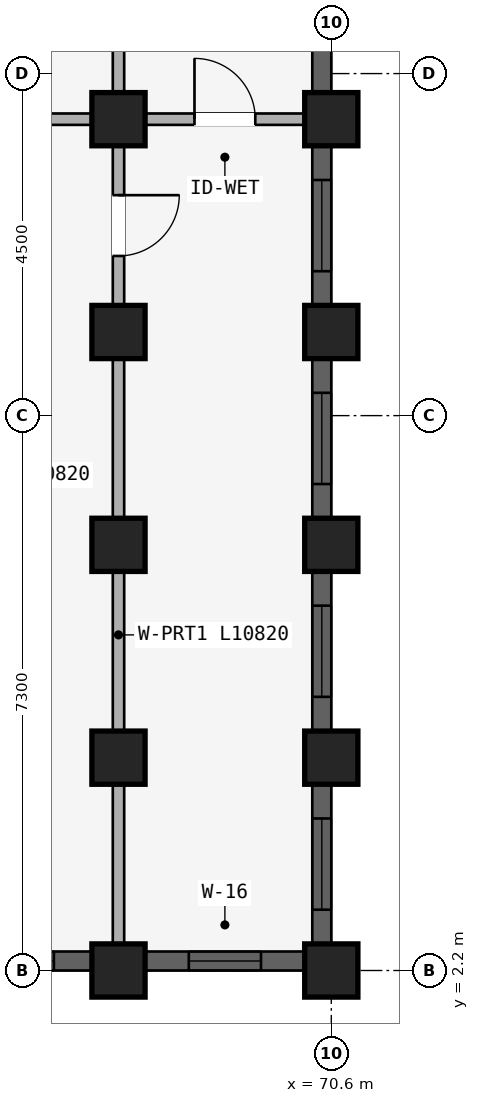
"""IFC4 building model, lengths in metres.
Left out: names, types, materials, properties, quantities, classifications, styles, units other than length and angle.
Written with IfcOpenShell. Run it as: python <this file> out.ifc"""

import sys

from ifc_helpers import new_model, si_unit, direction, frame, frame_2d, origin, origin_2d, place, context, subcontext, project, spatial, rectangle, extrude, element, fill, save


model = new_model("IFC4")
c1 = context("Model", 3, precision=1e-05, world=origin(), true_north=direction((0.0, 1.0)))
c2 = subcontext(c1, "Body", "Model", "MODEL_VIEW")
j1 = project(units=[si_unit("LENGTHUNIT", "METRE"), si_unit("PLANEANGLEUNIT", "RADIAN")], contexts=[c1])
p1 = place(None, origin())
s1 = spatial("IfcSite", under=j1, at=p1, CompositionType="ELEMENT")
p2 = place(p1, origin())
s2 = spatial("IfcBuilding", under=s1, at=p2, CompositionType="ELEMENT")
p3 = place(p2, frame((0.0, 0.0, 18.15)))
s3 = spatial("IfcBuildingStorey", under=s2, at=p3, CompositionType="ELEMENT", Elevation=18.15)
for number, where, z_axis, x_axis in (
    (1, (67.8, 13.4, 0.0), (0.0, 0.0, 1.0), (1.0, 0.0, 0.0)),
    (2, (67.8, 10.6, 0.0), (0.0, 0.0, 1.0), (1.0, 0.0, 0.0)),
    (3, (67.8, 7.8, 0.0), (0.0, 0.0, 1.0), (1.0, 0.0, 0.0)),
    (4, (67.8, 5.0, 0.0), (0.0, 0.0, 1.0), (1.0, 0.0, 0.0)),
):
    element("IfcColumn", number, at=place(p3, frame(where, z_axis=z_axis, x_axis=x_axis)), inside=s3, PredefinedType="COLUMN", context=c2, shape_type="SweptSolid", body=[
        extrude(rectangle(XDim=0.7, YDim=0.7, at=origin_2d()), origin(), (0.0, 0.0, 1.0), 2.93),
    ])
p4 = place(p3, frame((67.8, 2.2, 0.0), z_axis=(0.0, 0.0, 1.0), x_axis=(1.0, 0.0, 0.0)))
e5 = element("IfcColumn", 5, at=p4, inside=s3, PredefinedType="COLUMN", context=c2, shape_type="SweptSolid", body=[
    extrude(rectangle(XDim=0.7, YDim=0.7, at=origin_2d()), origin(), (0.0, 0.0, 1.0), 2.97),
])
for number, where, z_axis, x_axis in (
    (6, (70.6, 13.4, 0.0), (0.0, 0.0, 1.0), (1.0, 0.0, 0.0)),
    (7, (70.6, 10.6, 0.0), (0.0, 0.0, 1.0), (1.0, 0.0, 0.0)),
    (8, (70.6, 7.8, 0.0), (0.0, 0.0, 1.0), (1.0, 0.0, 0.0)),
    (9, (70.6, 5.0, 0.0), (0.0, 0.0, 1.0), (1.0, 0.0, 0.0)),
):
    element("IfcColumn", number, at=place(p3, frame(where, z_axis=z_axis, x_axis=x_axis)), inside=s3, PredefinedType="COLUMN", context=c2, shape_type="SweptSolid", body=[
        extrude(rectangle(XDim=0.7, YDim=0.7, at=origin_2d()), origin(), (0.0, 0.0, 1.0), 2.93),
    ])
p5 = place(p3, frame((70.6, 2.2, 0.0), z_axis=(0.0, 0.0, 1.0), x_axis=(1.0, 0.0, 0.0)))
e10 = element("IfcColumn", 10, at=p5, inside=s3, PredefinedType="COLUMN", context=c2, shape_type="SweptSolid", body=[
    extrude(rectangle(XDim=0.7, YDim=0.7, at=origin_2d()), origin(), (0.0, 0.0, 1.0), 2.97),
])
p6 = place(p3, frame((65.08, 13.4, 0.0), z_axis=(0.0, 0.0, 1.0), x_axis=(1.0, 0.0, 0.0)))
e11 = element("IfcWall", 11, at=p6, inside=s3, PredefinedType="PLUMBINGWALL", context=c2, shape_type="SweptSolid", body=[
    extrude(rectangle(XDim=2.64, YDim=0.15, at=frame_2d((1.32, 0.0))), origin(), (0.0, 0.0, 1.0), 2.372),
])
p7 = place(p6, frame((0.87, 0.0, 0.0)))
e12 = element("IfcOpeningElement", 12, at=p7, cuts=e11, PredefinedType="OPENING", context=c2, shape_type="SweptSolid", body=[
    extrude(rectangle(XDim=0.9, YDim=2.1, at=frame_2d((0.45, 1.05))), frame((0.0, 0.085, 0.0), z_axis=(0.0, -1.0, 0.0), x_axis=(1.0, 0.0, 0.0)), (0.0, 0.0, 1.0), 0.17),
])
p8 = place(p3, frame((67.88, 13.4, 0.0), z_axis=(0.0, 0.0, 1.0), x_axis=(1.0, 0.0, 0.0)))
e13 = element("IfcWall", 13, at=p8, inside=s3, PredefinedType="PLUMBINGWALL", context=c2, shape_type="SweptSolid", body=[
    extrude(rectangle(XDim=2.64, YDim=0.15, at=frame_2d((1.32, 0.0))), origin(), (0.0, 0.0, 1.0), 2.372),
])
p9 = place(p8, frame((0.92, 0.0, 0.0)))
e14 = element("IfcOpeningElement", 14, at=p9, cuts=e13, PredefinedType="OPENING", context=c2, shape_type="SweptSolid", body=[
    extrude(rectangle(XDim=0.8, YDim=2.1, at=frame_2d((0.4, 1.05))), frame((0.0, 0.085, 0.0), z_axis=(0.0, -1.0, 0.0), x_axis=(1.0, 0.0, 0.0)), (0.0, 0.0, 1.0), 0.17),
])
p10 = place(p3, frame((67.8, 19.95, 0.0), z_axis=(0.0, 0.0, 1.0), x_axis=(0.0, -1.0, 0.0)))
e15 = element("IfcWall", 15, at=p10, inside=s3, PredefinedType="PARTITIONING", context=c2, shape_type="SweptSolid", body=[
    extrude(rectangle(XDim=6.53, YDim=0.15, at=frame_2d((3.265, 0.0))), origin(), (0.0, 0.0, 1.0), 2.372),
])
p11 = place(p10, frame((2.815, 0.0, 0.0)))
e16 = element("IfcOpeningElement", 16, at=p11, cuts=e15, PredefinedType="OPENING", context=c2, shape_type="SweptSolid", body=[
    extrude(rectangle(XDim=0.9, YDim=2.1, at=frame_2d((0.45, 1.05))), frame((0.0, 0.085, 0.0), z_axis=(0.0, -1.0, 0.0), x_axis=(1.0, 0.0, 0.0)), (0.0, 0.0, 1.0), 0.17),
])
p12 = place(p3, frame((67.8, 13.3, 0.0), z_axis=(0.0, 0.0, 1.0), x_axis=(0.0, -1.0, 0.0)))
e17 = element("IfcWall", 17, at=p12, inside=s3, PredefinedType="PARTITIONING", context=c2, shape_type="SweptSolid", body=[
    extrude(rectangle(XDim=10.82, YDim=0.15, at=frame_2d((5.41, 0.0))), origin(), (0.0, 0.0, 1.0), 2.372),
])
p13 = place(p12, frame((0.899, 0.0, 0.0)))
e18 = element("IfcOpeningElement", 18, at=p13, cuts=e17, PredefinedType="OPENING", context=c2, shape_type="SweptSolid", body=[
    extrude(rectangle(XDim=0.8, YDim=2.1, at=frame_2d((0.4, 1.05))), frame((0.0, 0.085, 0.0), z_axis=(0.0, -1.0, 0.0), x_axis=(1.0, 0.0, 0.0)), (0.0, 0.0, 1.0), 0.17),
])
p14 = place(p3, frame((65.354, 2.325, 0.0), z_axis=(0.0, 0.0, 1.0), x_axis=(1.0, 0.0, 0.0)))
e19 = element("IfcWall", 19, at=p14, inside=s3, PredefinedType="STANDARD", context=c2, shape_type="SweptSolid", body=[
    extrude(rectangle(XDim=2.093, YDim=0.25, at=frame_2d((1.046, 0.0))), origin(), (0.0, 0.0, 1.0), 2.48),
])
p15 = place(p14, frame((0.497, 0.0, 0.83)))
e20 = element("IfcOpeningElement", 20, at=p15, cuts=e19, PredefinedType="OPENING", context=c2, shape_type="SweptSolid", body=[
    extrude(rectangle(XDim=1.1, YDim=1.45, at=frame_2d((0.55, 0.725))), frame((0.0, 0.135, 0.0), z_axis=(0.0, -1.0, 0.0), x_axis=(1.0, 0.0, 0.0)), (0.0, 0.0, 1.0), 0.27),
])
p16 = place(p3, frame((68.154, 2.325, 0.0), z_axis=(0.0, 0.0, 1.0), x_axis=(1.0, 0.0, 0.0)))
e21 = element("IfcWall", 21, at=p16, inside=s3, PredefinedType="STANDARD", context=c2, shape_type="SweptSolid", body=[
    extrude(rectangle(XDim=2.093, YDim=0.25, at=frame_2d((1.046, 0.0))), origin(), (0.0, 0.0, 1.0), 2.48),
])
p17 = place(p16, frame((0.572, 0.0, 0.88)))
e22 = element("IfcOpeningElement", 22, at=p17, cuts=e21, PredefinedType="OPENING", context=c2, shape_type="SweptSolid", body=[
    extrude(rectangle(XDim=0.95, YDim=1.35, at=frame_2d((0.475, 0.675))), frame((0.0, 0.135, 0.0), z_axis=(0.0, -1.0, 0.0), x_axis=(1.0, 0.0, 0.0)), (0.0, 0.0, 1.0), 0.27),
])
p18 = place(p3, frame((70.475, 19.646, 0.0), z_axis=(0.0, 0.0, 1.0), x_axis=(0.0, -1.0, 0.0)))
e23 = element("IfcWall", 23, at=p18, inside=s3, PredefinedType="STANDARD", context=c2, shape_type="SweptSolid", body=[
    extrude(rectangle(XDim=5.893, YDim=0.25, at=frame_2d((2.947, 0.0))), origin(), (0.0, 0.0, 1.0), 2.372),
])
p19 = place(p18, frame((2.197, 0.0, 0.522)))
e24 = element("IfcOpeningElement", 24, at=p19, cuts=e23, PredefinedType="OPENING", context=c2, shape_type="SweptSolid", body=[
    extrude(rectangle(XDim=1.5, YDim=1.65, at=frame_2d((0.75, 0.825))), frame((0.0, 0.135, 0.0), z_axis=(0.0, -1.0, 0.0), x_axis=(1.0, 0.0, 0.0)), (0.0, 0.0, 1.0), 0.27),
])
p20 = place(p3, frame((70.475, 13.046, 0.0), z_axis=(0.0, 0.0, 1.0), x_axis=(0.0, -1.0, 0.0)))
e25 = element("IfcWall", 25, at=p20, inside=s3, PredefinedType="STANDARD", context=c2, shape_type="SweptSolid", body=[
    extrude(rectangle(XDim=2.093, YDim=0.25, at=frame_2d((1.046, 0.0))), origin(), (0.0, 0.0, 1.0), 2.372),
])
p21 = place(p20, frame((0.447, 0.0, 0.672)))
e26 = element("IfcOpeningElement", 26, at=p21, cuts=e25, PredefinedType="OPENING", context=c2, shape_type="SweptSolid", body=[
    extrude(rectangle(XDim=1.2, YDim=1.5, at=frame_2d((0.6, 0.75))), frame((0.0, 0.135, 0.0), z_axis=(0.0, -1.0, 0.0), x_axis=(1.0, 0.0, 0.0)), (0.0, 0.0, 1.0), 0.27),
])
p22 = place(p3, frame((70.475, 10.247, 0.0), z_axis=(0.0, 0.0, 1.0), x_axis=(0.0, -1.0, 0.0)))
e27 = element("IfcWall", 27, at=p22, inside=s3, PredefinedType="STANDARD", context=c2, shape_type="SweptSolid", body=[
    extrude(rectangle(XDim=2.093, YDim=0.25, at=frame_2d((1.046, 0.0))), origin(), (0.0, 0.0, 1.0), 2.372),
])
p23 = place(p22, frame((0.447, 0.0, 0.672)))
e28 = element("IfcOpeningElement", 28, at=p23, cuts=e27, PredefinedType="OPENING", context=c2, shape_type="SweptSolid", body=[
    extrude(rectangle(XDim=1.2, YDim=1.5, at=frame_2d((0.6, 0.75))), frame((0.0, 0.135, 0.0), z_axis=(0.0, -1.0, 0.0), x_axis=(1.0, 0.0, 0.0)), (0.0, 0.0, 1.0), 0.27),
])
p24 = place(p3, frame((70.475, 7.447, 0.0), z_axis=(0.0, 0.0, 1.0), x_axis=(0.0, -1.0, 0.0)))
e29 = element("IfcWall", 29, at=p24, inside=s3, PredefinedType="STANDARD", context=c2, shape_type="SweptSolid", body=[
    extrude(rectangle(XDim=2.093, YDim=0.25, at=frame_2d((1.046, 0.0))), origin(), (0.0, 0.0, 1.0), 2.372),
])
p25 = place(p24, frame((0.447, 0.0, 0.672)))
e30 = element("IfcOpeningElement", 30, at=p25, cuts=e29, PredefinedType="OPENING", context=c2, shape_type="SweptSolid", body=[
    extrude(rectangle(XDim=1.2, YDim=1.5, at=frame_2d((0.6, 0.75))), frame((0.0, 0.135, 0.0), z_axis=(0.0, -1.0, 0.0), x_axis=(1.0, 0.0, 0.0)), (0.0, 0.0, 1.0), 0.27),
])
p26 = place(p3, frame((70.475, 4.646, 0.0), z_axis=(0.0, 0.0, 1.0), x_axis=(0.0, -1.0, 0.0)))
e31 = element("IfcWall", 31, at=p26, inside=s3, PredefinedType="STANDARD", context=c2, shape_type="SweptSolid", body=[
    extrude(rectangle(XDim=2.093, YDim=0.25, at=frame_2d((1.046, 0.0))), origin(), (0.0, 0.0, 1.0), 2.412),
])
p27 = place(p26, frame((0.447, 0.0, 0.712)))
e32 = element("IfcOpeningElement", 32, at=p27, cuts=e31, PredefinedType="OPENING", context=c2, shape_type="SweptSolid", body=[
    extrude(rectangle(XDim=1.2, YDim=1.5, at=frame_2d((0.6, 0.75))), frame((0.0, 0.135, 0.0), z_axis=(0.0, -1.0, 0.0), x_axis=(1.0, 0.0, 0.0)), (0.0, 0.0, 1.0), 0.27),
])
p28 = place(p15, origin())
e33 = element("IfcWindow", 33, at=p28, inside=s3, PartitioningType="SINGLE_PANEL", PredefinedType="WINDOW", context=c2, shape_type="SweptSolid", body=[
    extrude(rectangle(XDim=1.1, YDim=1.45, at=frame_2d((0.55, 0.725))), frame((0.0, 0.03, 0.0), z_axis=(0.0, -1.0, 0.0), x_axis=(1.0, 0.0, 0.0)), (0.0, 0.0, 1.0), 0.06),
])
fill(e20, e33)
p29 = place(p17, origin())
e34 = element("IfcWindow", 34, at=p29, inside=s3, PartitioningType="SINGLE_PANEL", PredefinedType="WINDOW", context=c2, shape_type="SweptSolid", body=[
    extrude(rectangle(XDim=0.95, YDim=1.35, at=frame_2d((0.475, 0.675))), frame((0.0, 0.03, 0.0), z_axis=(0.0, -1.0, 0.0), x_axis=(1.0, 0.0, 0.0)), (0.0, 0.0, 1.0), 0.06),
])
fill(e22, e34)
p30 = place(p21, origin())
e35 = element("IfcWindow", 35, at=p30, inside=s3, PartitioningType="SINGLE_PANEL", PredefinedType="WINDOW", context=c2, shape_type="SweptSolid", body=[
    extrude(rectangle(XDim=1.2, YDim=1.5, at=frame_2d((0.6, 0.75))), frame((0.0, 0.03, 0.0), z_axis=(0.0, -1.0, 0.0), x_axis=(1.0, 0.0, 0.0)), (0.0, 0.0, 1.0), 0.06),
])
fill(e26, e35)
p31 = place(p23, origin())
e36 = element("IfcWindow", 36, at=p31, inside=s3, PartitioningType="SINGLE_PANEL", PredefinedType="WINDOW", context=c2, shape_type="SweptSolid", body=[
    extrude(rectangle(XDim=1.2, YDim=1.5, at=frame_2d((0.6, 0.75))), frame((0.0, 0.03, 0.0), z_axis=(0.0, -1.0, 0.0), x_axis=(1.0, 0.0, 0.0)), (0.0, 0.0, 1.0), 0.06),
])
fill(e28, e36)
p32 = place(p25, origin())
e37 = element("IfcWindow", 37, at=p32, inside=s3, PartitioningType="SINGLE_PANEL", PredefinedType="WINDOW", context=c2, shape_type="SweptSolid", body=[
    extrude(rectangle(XDim=1.2, YDim=1.5, at=frame_2d((0.6, 0.75))), frame((0.0, 0.03, 0.0), z_axis=(0.0, -1.0, 0.0), x_axis=(1.0, 0.0, 0.0)), (0.0, 0.0, 1.0), 0.06),
])
fill(e30, e37)
p33 = place(p27, origin())
e38 = element("IfcWindow", 38, at=p33, inside=s3, PartitioningType="SINGLE_PANEL", PredefinedType="WINDOW", context=c2, shape_type="SweptSolid", body=[
    extrude(rectangle(XDim=1.2, YDim=1.5, at=frame_2d((0.6, 0.75))), frame((0.0, 0.03, 0.0), z_axis=(0.0, -1.0, 0.0), x_axis=(1.0, 0.0, 0.0)), (0.0, 0.0, 1.0), 0.06),
])
fill(e32, e38)
p34 = place(p9, origin())
e39 = element("IfcDoor", 39, at=p34, inside=s3, OperationType="SINGLE_SWING_LEFT", PredefinedType="DOOR", context=c2, shape_type="SweptSolid", body=[
    extrude(rectangle(XDim=0.8, YDim=2.1, at=frame_2d((0.4, 1.05))), frame((0.0, 0.025, 0.0), z_axis=(0.0, -1.0, 0.0), x_axis=(1.0, 0.0, 0.0)), (0.0, 0.0, 1.0), 0.05),
])
fill(e14, e39)
p35 = place(p13, frame((0.8, 0.0, 0.0), z_axis=(0.0, 0.0, 1.0), x_axis=(-1.0, 0.0, 0.0)))
e40 = element("IfcDoor", 40, at=p35, inside=s3, OperationType="SINGLE_SWING_RIGHT", PredefinedType="DOOR", context=c2, shape_type="SweptSolid", body=[
    extrude(rectangle(XDim=0.8, YDim=2.1, at=frame_2d((0.4, 1.05))), frame((0.0, 0.025, 0.0), z_axis=(0.0, -1.0, 0.0), x_axis=(1.0, 0.0, 0.0)), (0.0, 0.0, 1.0), 0.05),
])
fill(e18, e40)
save(model, sys.argv[1])
